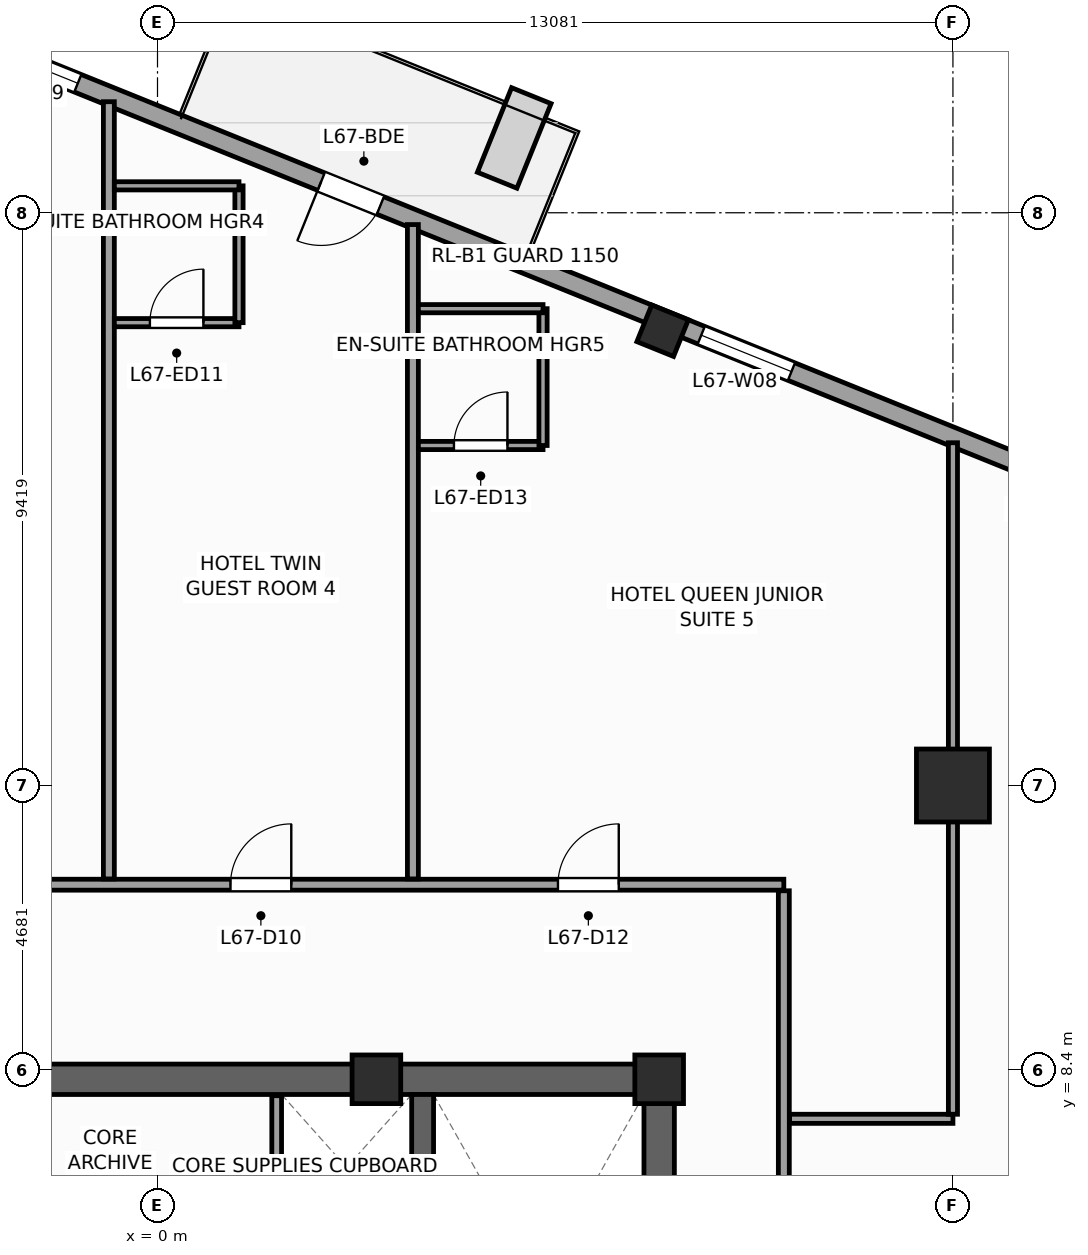
"""IFC4 building model, lengths in metres.
Left out: names, types, materials, properties, quantities, classifications, styles, units other than length and angle.
Written with IfcOpenShell. Run it as: python <this file> out.ifc"""

import sys

from ifc_helpers import new_model, si_unit, direction, frame, frame_2d, origin, origin_2d, place, context, subcontext, project, spatial, rectangle, extrude, source, transform, mapped, element, fill, save


model = new_model("IFC4")
c1 = context("Model", 3, precision=1e-05, world=origin(), true_north=direction((0.0, 1.0)))
c2 = subcontext(c1, "Body", "Model", "MODEL_VIEW")
j1 = project(units=[si_unit("LENGTHUNIT", "METRE"), si_unit("PLANEANGLEUNIT", "RADIAN")], contexts=[c1])
p1 = place(None, origin())
s1 = spatial("IfcSite", under=j1, at=p1, CompositionType="ELEMENT")
p2 = place(p1, origin())
s2 = spatial("IfcBuilding", under=s1, at=p2, CompositionType="ELEMENT")
p3 = place(p2, frame((0.0, 0.0, 276.0)))
s3 = spatial("IfcBuildingStorey", under=s2, at=p3, CompositionType="ELEMENT", Elevation=276.0)
p4 = place(p3, frame((-8.5, 8.25, 0.0), z_axis=(0.0, 0.0, 1.0), x_axis=(1.0, 0.0, 0.0)))
e1 = element("IfcWall", 1, at=p4, inside=s3, PredefinedType="SHEAR", context=c2, shape_type="SweptSolid", body=[
    extrude(rectangle(XDim=17.0, YDim=0.5, at=frame_2d((8.5, 0.0))), origin(), (0.0, 0.0, 1.0), 3.6),
])
p5 = place(p3, frame((8.25, -8.0, 0.0), z_axis=(0.0, 0.0, 1.0), x_axis=(0.0, 1.0, 0.0)))
e2 = element("IfcWall", 2, at=p5, inside=s3, PredefinedType="SHEAR", context=c2, shape_type="SweptSolid", body=[
    extrude(rectangle(XDim=16.0, YDim=0.5, at=frame_2d((8.0, 0.0))), origin(), (0.0, 0.0, 1.0), 3.6),
])
p6 = place(p5, frame((4.69, 0.0, 0.0)))
e3 = element("IfcOpeningElement", 3, at=p6, cuts=e2, PredefinedType="OPENING", context=c2, shape_type="SweptSolid", body=[
    extrude(rectangle(XDim=1.3, YDim=2.2, at=frame_2d((0.65, 1.1))), frame((0.0, 0.26, 0.0), z_axis=(0.0, -1.0, 0.0), x_axis=(1.0, 0.0, 0.0)), (0.0, 0.0, 1.0), 0.52),
])
p7 = place(p3, frame((4.36, -8.0, 0.0), z_axis=(0.0, 0.0, 1.0), x_axis=(0.0, 1.0, 0.0)))
e4 = element("IfcWall", 4, at=p7, inside=s3, PredefinedType="SHEAR", context=c2, shape_type="SweptSolid", body=[
    extrude(rectangle(XDim=16.0, YDim=0.36, at=frame_2d((8.0, 0.0))), origin(), (0.0, 0.0, 1.0), 3.6),
])
m1 = source(origin(), c2, "Body", "SweptSolid", [
    extrude(rectangle(XDim=0.8, YDim=0.8, at=origin_2d()), origin(), (0.0, 0.0, 1.0), 3.6),
])
for number, where, z_axis, x_axis in (
    (5, (8.25, 8.25, 0.0), (0.0, 0.0, 1.0), (1.0, 0.0, 0.0)),
    (6, (3.6, 8.25, 0.0), (0.0, 0.0, 1.0), (1.0, 0.0, 0.0)),
):
    element("IfcColumn", number, at=place(p3, frame(where, z_axis=z_axis, x_axis=x_axis)), inside=s3, PredefinedType="PILASTER", context=c2, shape_type="MappedRepresentation", body=[
        mapped(m1, transform((0.0, 0.0, 0.0), scale=1.0)),
    ])
m2 = source(origin(), c2, "Body", "SweptSolid", [
    extrude(rectangle(XDim=1.2, YDim=1.2, at=origin_2d()), origin(), (0.0, 0.0, 1.0), 3.6),
])
p8 = place(p3, frame((13.081, 13.081, 0.0), z_axis=(0.0, 0.0, 1.0), x_axis=(1.0, 0.0, 0.0)))
e7 = element("IfcColumn", 7, at=p8, inside=s3, PredefinedType="COLUMN", context=c2, shape_type="MappedRepresentation", body=[
    mapped(m2, transform((0.0, 0.0, 0.0), scale=1.0)),
])
m3 = source(origin(), c2, "Body", "SweptSolid", [
    extrude(rectangle(XDim=0.65, YDim=0.65, at=origin_2d()), origin(), (0.0, 0.0, 1.0), 3.6),
])
p9 = place(p3, frame((8.307, 20.56, 0.0), z_axis=(0.0, 0.0, 1.0), x_axis=(0.374606593416, 0.927183854567, 0.0)))
e8 = element("IfcColumn", 8, at=p9, inside=s3, PredefinedType="COLUMN", context=c2, shape_type="MappedRepresentation", body=[
    mapped(m3, transform((0.0, 0.0, 0.0), scale=1.0)),
])
p10 = place(p3, frame((23.813, 14.479, 0.0), z_axis=(0.0, 0.0, 1.0), x_axis=(-0.927182657188, 0.374609557019, 0.0)))
e9 = element("IfcWall", 9, at=p10, inside=s3, PredefinedType="STANDARD", context=c2, shape_type="SweptSolid", body=[
    extrude(rectangle(XDim=33.31, YDim=0.31, at=frame_2d((16.655, 0.0))), origin(), (0.0, 0.0, 1.0), 2.75),
])
p11 = place(p10, frame((21.73, 0.0, 0.0)))
e10 = element("IfcOpeningElement", 10, at=p11, cuts=e9, PredefinedType="OPENING", context=c2, shape_type="SweptSolid", body=[
    extrude(rectangle(XDim=1.05, YDim=2.25, at=frame_2d((0.525, 1.125))), frame((0.0, 0.165, 0.0), z_axis=(0.0, -1.0, 0.0), x_axis=(1.0, 0.0, 0.0)), (0.0, 0.0, 1.0), 0.33),
])
p12 = place(p10, frame((3.197, 0.0, 0.47)))
e11 = element("IfcOpeningElement", 11, at=p12, cuts=e9, PredefinedType="OPENING", context=c2, shape_type="SweptSolid", body=[
    extrude(rectangle(XDim=1.6, YDim=2.1, at=frame_2d((0.8, 1.05))), frame((0.0, 0.165, 0.0), z_axis=(0.0, -1.0, 0.0), x_axis=(1.0, 0.0, 0.0)), (0.0, 0.0, 1.0), 0.33),
])
p13 = place(p10, frame((8.86, 0.0, 0.47)))
e12 = element("IfcOpeningElement", 12, at=p13, cuts=e9, PredefinedType="OPENING", context=c2, shape_type="SweptSolid", body=[
    extrude(rectangle(XDim=1.6, YDim=2.1, at=frame_2d((0.8, 1.05))), frame((0.0, 0.165, 0.0), z_axis=(0.0, -1.0, 0.0), x_axis=(1.0, 0.0, 0.0)), (0.0, 0.0, 1.0), 0.33),
])
p14 = place(p10, frame((14.439, 0.0, 0.47)))
e13 = element("IfcOpeningElement", 13, at=p14, cuts=e9, PredefinedType="OPENING", context=c2, shape_type="SweptSolid", body=[
    extrude(rectangle(XDim=1.6, YDim=2.1, at=frame_2d((0.8, 1.05))), frame((0.0, 0.165, 0.0), z_axis=(0.0, -1.0, 0.0), x_axis=(1.0, 0.0, 0.0)), (0.0, 0.0, 1.0), 0.33),
])
p15 = place(p10, frame((27.097, 0.0, 0.47)))
e14 = element("IfcOpeningElement", 14, at=p15, cuts=e9, PredefinedType="OPENING", context=c2, shape_type="SweptSolid", body=[
    extrude(rectangle(XDim=1.6, YDim=2.1, at=frame_2d((0.8, 1.05))), frame((0.0, 0.165, 0.0), z_axis=(0.0, -1.0, 0.0), x_axis=(1.0, 0.0, 0.0)), (0.0, 0.0, 1.0), 0.33),
])
p16 = place(p3, frame((1.96, 4.58, 0.0), z_axis=(0.0, 0.0, 1.0), x_axis=(0.0, 1.0, 0.0)))
e15 = element("IfcWall", 15, at=p16, inside=s3, PredefinedType="PARTITIONING", context=c2, shape_type="SweptSolid", body=[
    extrude(rectangle(XDim=3.4, YDim=0.16, at=frame_2d((1.7, 0.0))), origin(), (0.0, 0.0, 1.0), 3.35),
])
p17 = place(p3, frame((-11.45, 11.45, 0.0), z_axis=(0.0, 0.0, 1.0), x_axis=(1.0, 0.0, 0.0)))
e16 = element("IfcWall", 16, at=p17, inside=s3, PredefinedType="PARTITIONING", context=c2, shape_type="SweptSolid", body=[
    extrude(rectangle(XDim=21.75, YDim=0.18, at=frame_2d((10.875, 0.0))), origin(), (0.0, 0.0, 1.0), 3.35),
])
p18 = place(p17, frame((2.639, 0.0, 0.0)))
e17 = element("IfcOpeningElement", 17, at=p18, cuts=e16, PredefinedType="OPENING", context=c2, shape_type="SweptSolid", body=[
    extrude(rectangle(XDim=1.0, YDim=2.15, at=frame_2d((0.5, 1.075))), frame((0.0, 0.1, 0.0), z_axis=(0.0, -1.0, 0.0), x_axis=(1.0, 0.0, 0.0)), (0.0, 0.0, 1.0), 0.2),
])
p19 = place(p17, frame((7.8, 0.0, 0.0)))
e18 = element("IfcOpeningElement", 18, at=p19, cuts=e16, PredefinedType="OPENING", context=c2, shape_type="SweptSolid", body=[
    extrude(rectangle(XDim=1.0, YDim=2.15, at=frame_2d((0.5, 1.075))), frame((0.0, 0.1, 0.0), z_axis=(0.0, -1.0, 0.0), x_axis=(1.0, 0.0, 0.0)), (0.0, 0.0, 1.0), 0.2),
])
p20 = place(p17, frame((12.65, 0.0, 0.0)))
e19 = element("IfcOpeningElement", 19, at=p20, cuts=e16, PredefinedType="OPENING", context=c2, shape_type="SweptSolid", body=[
    extrude(rectangle(XDim=1.0, YDim=2.15, at=frame_2d((0.5, 1.075))), frame((0.0, 0.1, 0.0), z_axis=(0.0, -1.0, 0.0), x_axis=(1.0, 0.0, 0.0)), (0.0, 0.0, 1.0), 0.2),
])
p21 = place(p17, frame((18.036, 0.0, 0.0)))
e20 = element("IfcOpeningElement", 20, at=p21, cuts=e16, PredefinedType="OPENING", context=c2, shape_type="SweptSolid", body=[
    extrude(rectangle(XDim=1.0, YDim=2.15, at=frame_2d((0.5, 1.075))), frame((0.0, 0.1, 0.0), z_axis=(0.0, -1.0, 0.0), x_axis=(1.0, 0.0, 0.0)), (0.0, 0.0, 1.0), 0.2),
])
p22 = place(p3, frame((10.3, -12.35, 0.0), z_axis=(0.0, 0.0, 1.0), x_axis=(0.0, 1.0, 0.0)))
e21 = element("IfcWall", 21, at=p22, inside=s3, PredefinedType="PARTITIONING", context=c2, shape_type="SweptSolid", body=[
    extrude(rectangle(XDim=23.7, YDim=0.18, at=frame_2d((11.85, 0.0))), origin(), (0.0, 0.0, 1.0), 3.35),
])
p23 = place(p22, frame((17.65, 0.0, 0.0)))
e22 = element("IfcOpeningElement", 22, at=p23, cuts=e21, PredefinedType="OPENING", context=c2, shape_type="SweptSolid", body=[
    extrude(rectangle(XDim=1.0, YDim=2.15, at=frame_2d((0.5, 1.075))), frame((0.0, 0.1, 0.0), z_axis=(0.0, -1.0, 0.0), x_axis=(1.0, 0.0, 0.0)), (0.0, 0.0, 1.0), 0.2),
])
p24 = place(p22, frame((13.85, 0.0, 0.0)))
e23 = element("IfcOpeningElement", 23, at=p24, cuts=e21, PredefinedType="OPENING", context=c2, shape_type="SweptSolid", body=[
    extrude(rectangle(XDim=1.0, YDim=2.15, at=frame_2d((0.5, 1.075))), frame((0.0, 0.1, 0.0), z_axis=(0.0, -1.0, 0.0), x_axis=(1.0, 0.0, 0.0)), (0.0, 0.0, 1.0), 0.2),
])
p25 = place(p22, frame((9.85, 0.0, 0.0)))
e24 = element("IfcOpeningElement", 24, at=p25, cuts=e21, PredefinedType="OPENING", context=c2, shape_type="SweptSolid", body=[
    extrude(rectangle(XDim=1.0, YDim=2.15, at=frame_2d((0.5, 1.075))), frame((0.0, 0.1, 0.0), z_axis=(0.0, -1.0, 0.0), x_axis=(1.0, 0.0, 0.0)), (0.0, 0.0, 1.0), 0.2),
])
p26 = place(p22, frame((6.05, 0.0, 0.0)))
e25 = element("IfcOpeningElement", 25, at=p26, cuts=e21, PredefinedType="OPENING", context=c2, shape_type="SweptSolid", body=[
    extrude(rectangle(XDim=1.0, YDim=2.15, at=frame_2d((0.5, 1.075))), frame((0.0, 0.1, 0.0), z_axis=(0.0, -1.0, 0.0), x_axis=(1.0, 0.0, 0.0)), (0.0, 0.0, 1.0), 0.2),
])
p27 = place(p3, frame((-0.8, 11.545, 0.0), z_axis=(0.0, 0.0, 1.0), x_axis=(0.0, 1.0, 0.0)))
e26 = element("IfcWall", 26, at=p27, inside=s3, PredefinedType="PARTITIONING", context=c2, shape_type="SweptSolid", body=[
    extrude(rectangle(XDim=12.781, YDim=0.18, at=frame_2d((6.391, 0.0))), origin(), (0.0, 0.0, 1.0), 3.35),
])
p28 = place(p3, frame((4.2, 11.545, 0.0), z_axis=(0.0, 0.0, 1.0), x_axis=(0.0, 1.0, 0.0)))
e27 = element("IfcWall", 27, at=p28, inside=s3, PredefinedType="PARTITIONING", context=c2, shape_type="SweptSolid", body=[
    extrude(rectangle(XDim=10.761, YDim=0.18, at=frame_2d((5.38, 0.0))), origin(), (0.0, 0.0, 1.0), 3.35),
])
p29 = place(p3, frame((10.395, 7.6, 0.0), z_axis=(0.0, 0.0, 1.0), x_axis=(1.0, 0.0, 0.0)))
e28 = element("IfcWall", 28, at=p29, inside=s3, PredefinedType="PARTITIONING", context=c2, shape_type="SweptSolid", body=[
    extrude(rectangle(XDim=2.686, YDim=0.15, at=frame_2d((1.343, 0.0))), origin(), (0.0, 0.0, 1.0), 3.35),
])
p30 = place(p3, frame((13.081, 7.675, 0.0), z_axis=(0.0, 0.0, 1.0), x_axis=(0.0, 1.0, 0.0)))
e29 = element("IfcWall", 29, at=p30, inside=s3, PredefinedType="PARTITIONING", context=c2, shape_type="SweptSolid", body=[
    extrude(rectangle(XDim=11.043, YDim=0.15, at=frame_2d((5.521, 0.0))), origin(), (0.0, 0.0, 1.0), 2.45),
])
p31 = place(p3, frame((-0.71, 20.693, 0.0), z_axis=(0.0, 0.0, 1.0), x_axis=(1.0, 0.0, 0.0)))
e30 = element("IfcWall", 30, at=p31, inside=s3, PredefinedType="PARTITIONING", context=c2, shape_type="SweptSolid", body=[
    extrude(rectangle(XDim=2.05, YDim=0.135, at=frame_2d((1.025, 0.0))), origin(), (0.0, 0.0, 1.0), 3.35),
])
p32 = place(p31, frame((0.585, 0.0, 0.0)))
e31 = element("IfcOpeningElement", 31, at=p32, cuts=e30, PredefinedType="OPENING", context=c2, shape_type="SweptSolid", body=[
    extrude(rectangle(XDim=0.88, YDim=2.1, at=frame_2d((0.44, 1.05))), frame((0.0, 0.078, 0.0), z_axis=(0.0, -1.0, 0.0), x_axis=(1.0, 0.0, 0.0)), (0.0, 0.0, 1.0), 0.155),
])
p33 = place(p3, frame((1.34, 20.693, 0.0), z_axis=(0.0, 0.0, 1.0), x_axis=(0.0, 1.0, 0.0)))
e32 = element("IfcWall", 32, at=p33, inside=s3, PredefinedType="PARTITIONING", context=c2, shape_type="SweptSolid", body=[
    extrude(rectangle(XDim=2.25, YDim=0.135, at=frame_2d((1.125, 0.0))), origin(), (0.0, 0.0, 1.0), 3.35),
])
p34 = place(p3, frame((-0.71, 22.943, 0.0), z_axis=(0.0, 0.0, 1.0), x_axis=(1.0, 0.0, 0.0)))
e33 = element("IfcWall", 33, at=p34, inside=s3, PredefinedType="PARTITIONING", context=c2, shape_type="SweptSolid", body=[
    extrude(rectangle(XDim=2.05, YDim=0.135, at=frame_2d((1.025, 0.0))), origin(), (0.0, 0.0, 1.0), 3.35),
])
p35 = place(p3, frame((4.29, 18.673, 0.0), z_axis=(0.0, 0.0, 1.0), x_axis=(1.0, 0.0, 0.0)))
e34 = element("IfcWall", 34, at=p35, inside=s3, PredefinedType="PARTITIONING", context=c2, shape_type="SweptSolid", body=[
    extrude(rectangle(XDim=2.05, YDim=0.135, at=frame_2d((1.025, 0.0))), origin(), (0.0, 0.0, 1.0), 2.95),
])
p36 = place(p35, frame((0.585, 0.0, 0.0)))
e35 = element("IfcOpeningElement", 35, at=p36, cuts=e34, PredefinedType="OPENING", context=c2, shape_type="SweptSolid", body=[
    extrude(rectangle(XDim=0.88, YDim=2.1, at=frame_2d((0.44, 1.05))), frame((0.0, 0.078, 0.0), z_axis=(0.0, -1.0, 0.0), x_axis=(1.0, 0.0, 0.0)), (0.0, 0.0, 1.0), 0.155),
])
p37 = place(p3, frame((6.34, 18.673, 0.0), z_axis=(0.0, 0.0, 1.0), x_axis=(0.0, 1.0, 0.0)))
e36 = element("IfcWall", 36, at=p37, inside=s3, PredefinedType="PARTITIONING", context=c2, shape_type="SweptSolid", body=[
    extrude(rectangle(XDim=2.25, YDim=0.135, at=frame_2d((1.125, 0.0))), origin(), (0.0, 0.0, 1.0), 3.35),
])
p38 = place(p3, frame((4.29, 20.923, 0.0), z_axis=(0.0, 0.0, 1.0), x_axis=(1.0, 0.0, 0.0)))
e37 = element("IfcWall", 37, at=p38, inside=s3, PredefinedType="PARTITIONING", context=c2, shape_type="SweptSolid", body=[
    extrude(rectangle(XDim=2.05, YDim=0.135, at=frame_2d((1.025, 0.0))), origin(), (0.0, 0.0, 1.0), 3.35),
])
m4 = source(origin(), c2, "Body", "SweptSolid", [
    extrude(rectangle(XDim=1.05, YDim=2.25, at=frame_2d((0.525, 1.125))), frame((0.0, 0.025, 0.0), z_axis=(0.0, -1.0, 0.0), x_axis=(1.0, 0.0, 0.0)), (0.0, 0.0, 1.0), 0.05),
])
p39 = place(p11, origin())
e38 = element("IfcDoor", 38, at=p39, inside=s3, OperationType="SINGLE_SWING_RIGHT", PredefinedType="DOOR", context=c2, shape_type="MappedRepresentation", body=[
    mapped(m4, transform((0.0, 0.0, 0.0), scale=1.0)),
])
fill(e10, e38)
m5 = source(origin(), c2, "Body", "SweptSolid", [
    extrude(rectangle(XDim=1.6, YDim=2.1, at=frame_2d((0.8, 1.05))), frame((0.0, 0.03, 0.0), z_axis=(0.0, -1.0, 0.0), x_axis=(1.0, 0.0, 0.0)), (0.0, 0.0, 1.0), 0.06),
])
p40 = place(p14, origin())
e39 = element("IfcWindow", 39, at=p40, inside=s3, PartitioningType="SINGLE_PANEL", PredefinedType="WINDOW", context=c2, shape_type="MappedRepresentation", body=[
    mapped(m5, transform((0.0, 0.0, 0.0), scale=1.0)),
])
fill(e13, e39)
p41 = place(p15, origin())
e40 = element("IfcWindow", 40, at=p41, inside=s3, PartitioningType="SINGLE_PANEL", PredefinedType="WINDOW", context=c2, shape_type="MappedRepresentation", body=[
    mapped(m5, transform((0.0, 0.0, 0.0), scale=1.0)),
])
fill(e14, e40)
m6 = source(origin(), c2, "Body", "SweptSolid", [
    extrude(rectangle(XDim=1.0, YDim=2.15, at=frame_2d((0.5, 1.075))), frame((0.0, 0.025, 0.0), z_axis=(0.0, -1.0, 0.0), x_axis=(1.0, 0.0, 0.0)), (0.0, 0.0, 1.0), 0.05),
])
p42 = place(p20, origin())
e41 = element("IfcDoor", 41, at=p42, inside=s3, OperationType="SINGLE_SWING_RIGHT", PredefinedType="DOOR", context=c2, shape_type="MappedRepresentation", body=[
    mapped(m6, transform((0.0, 0.0, 0.0), scale=1.0)),
])
fill(e19, e41)
m7 = source(origin(), c2, "Body", "SweptSolid", [
    extrude(rectangle(XDim=0.88, YDim=2.1, at=frame_2d((0.44, 1.05))), frame((0.0, 0.025, 0.0), z_axis=(0.0, -1.0, 0.0), x_axis=(1.0, 0.0, 0.0)), (0.0, 0.0, 1.0), 0.05),
])
p43 = place(p32, origin())
e42 = element("IfcDoor", 42, at=p43, inside=s3, OperationType="SINGLE_SWING_RIGHT", PredefinedType="DOOR", context=c2, shape_type="MappedRepresentation", body=[
    mapped(m7, transform((0.0, 0.0, 0.0), scale=1.0)),
])
fill(e31, e42)
p44 = place(p21, origin())
e43 = element("IfcDoor", 43, at=p44, inside=s3, OperationType="SINGLE_SWING_RIGHT", PredefinedType="DOOR", context=c2, shape_type="MappedRepresentation", body=[
    mapped(m6, transform((0.0, 0.0, 0.0), scale=1.0)),
])
fill(e20, e43)
p45 = place(p36, origin())
e44 = element("IfcDoor", 44, at=p45, inside=s3, OperationType="SINGLE_SWING_RIGHT", PredefinedType="DOOR", context=c2, shape_type="MappedRepresentation", body=[
    mapped(m7, transform((0.0, 0.0, 0.0), scale=1.0)),
])
fill(e35, e44)
save(model, sys.argv[1])
